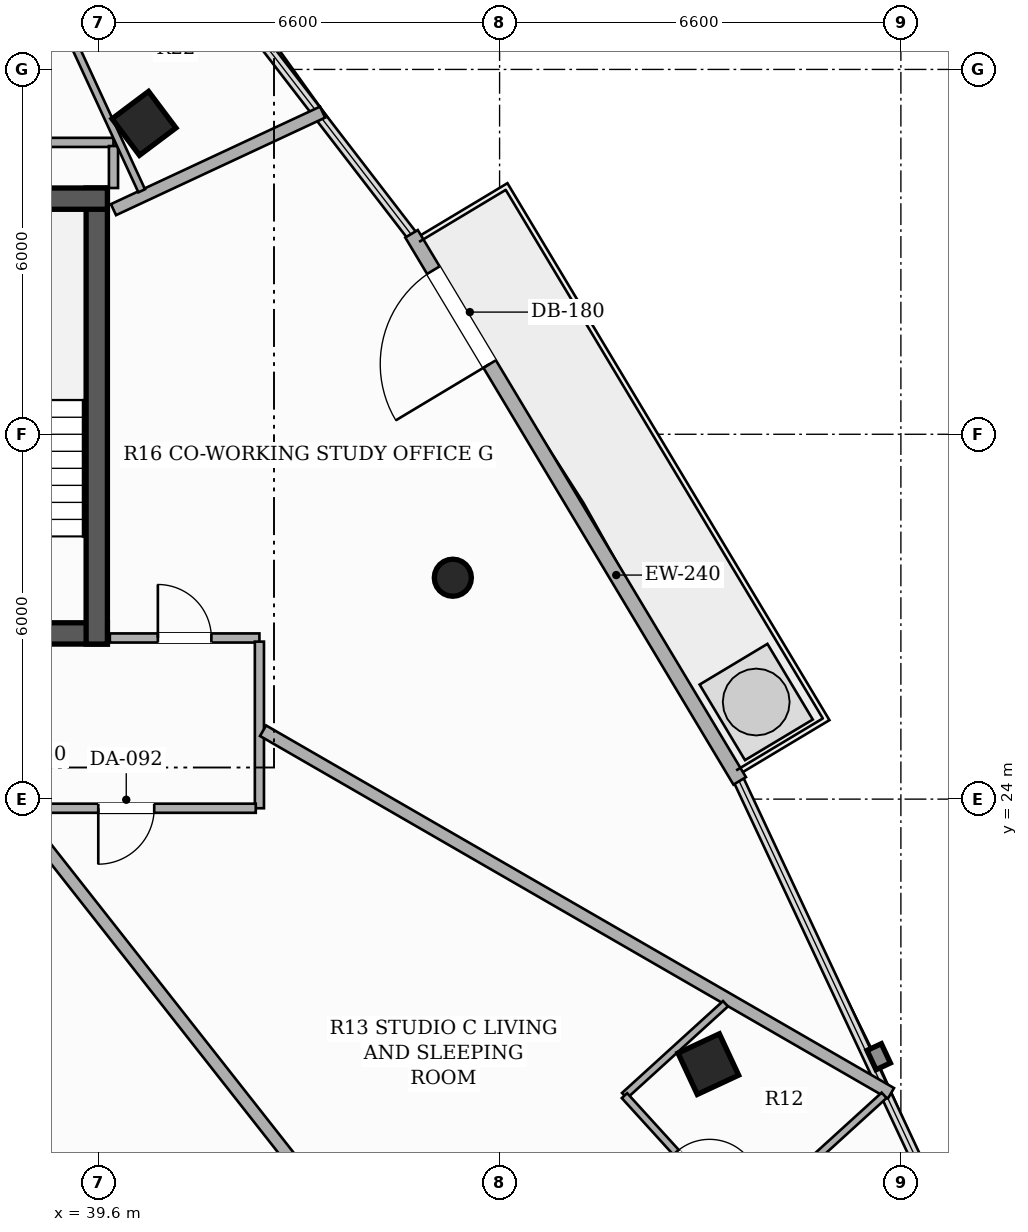
"""IFC4 building model, lengths in metres.
Left out: names, types, materials, properties, quantities, classifications, styles, units other than length and angle.
Written with IfcOpenShell. Run it as: python <this file> out.ifc"""

import sys

from ifc_helpers import new_model, si_unit, direction, frame, frame_2d, origin, origin_2d, place, context, subcontext, project, spatial, rectangle, hollow_rectangle, hollow_circle, extrude, element, fill, save


model = new_model("IFC4")
c1 = context("Model", 3, precision=1e-05, world=origin(), true_north=direction((0.0, 1.0)))
c2 = subcontext(c1, "Body", "Model", "MODEL_VIEW")
j1 = project(units=[si_unit("LENGTHUNIT", "METRE"), si_unit("PLANEANGLEUNIT", "RADIAN")], contexts=[c1])
p1 = place(None, origin())
s1 = spatial("IfcSite", under=j1, at=p1, CompositionType="ELEMENT")
p2 = place(p1, origin())
s2 = spatial("IfcBuilding", under=s1, at=p2, CompositionType="ELEMENT")
p3 = place(p2, frame((0.0, 0.0, 199.7)))
s3 = spatial("IfcBuildingStorey", under=s2, at=p3, CompositionType="ELEMENT", Elevation=199.7)
p4 = place(p3, frame((26.25, 26.725, 0.0), z_axis=(0.0, 0.0, 1.0), x_axis=(1.0, 0.0, 0.0)))
e1 = element("IfcWall", 1, at=p4, inside=s3, PredefinedType="SHEAR", context=c2, shape_type="SweptSolid", body=[
    extrude(rectangle(XDim=13.5, YDim=0.35, at=frame_2d((6.75, 0.0))), origin(), (0.0, 0.0, 1.0), 3.3),
])
p5 = place(p4, frame((4.35, 0.0, 0.0)))
e2 = element("IfcOpeningElement", 2, at=p5, cuts=e1, PredefinedType="OPENING", context=c2, shape_type="SweptSolid", body=[
    extrude(rectangle(XDim=1.05, YDim=2.15, at=frame_2d((0.525, 1.075))), frame((0.0, 0.185, 0.0), z_axis=(0.0, -1.0, 0.0), x_axis=(1.0, 0.0, 0.0)), (0.0, 0.0, 1.0), 0.37),
])
p6 = place(p4, frame((8.3, 0.0, 0.0)))
e3 = element("IfcOpeningElement", 3, at=p6, cuts=e1, PredefinedType="OPENING", context=c2, shape_type="SweptSolid", body=[
    extrude(rectangle(XDim=1.05, YDim=2.15, at=frame_2d((0.525, 1.075))), frame((0.0, 0.185, 0.0), z_axis=(0.0, -1.0, 0.0), x_axis=(1.0, 0.0, 0.0)), (0.0, 0.0, 1.0), 0.37),
])
p7 = place(p3, frame((39.575, 26.55, 0.0), z_axis=(0.0, 0.0, 1.0), x_axis=(0.0, 1.0, 0.0)))
e4 = element("IfcWall", 4, at=p7, inside=s3, PredefinedType="SHEAR", context=c2, shape_type="SweptSolid", body=[
    extrude(rectangle(XDim=7.5, YDim=0.35, at=frame_2d((3.75, 0.0))), origin(), (0.0, 0.0, 1.0), 3.3),
])
p8 = place(p3, frame((36.15, 33.875, 0.0), z_axis=(0.0, 0.0, 1.0), x_axis=(1.0, 0.0, 0.0)))
e5 = element("IfcWall", 5, at=p8, inside=s3, PredefinedType="SHEAR", context=c2, shape_type="SweptSolid", body=[
    extrude(rectangle(XDim=3.6, YDim=0.35, at=frame_2d((1.8, 0.0))), origin(), (0.0, 0.0, 1.0), 3.3),
])
p9 = place(p3, frame((49.633, 19.642, 0.0), z_axis=(0.0, 0.0, 1.0), x_axis=(-0.422618261741, 0.906307787037, 0.0)))
e6 = element("IfcColumn", 6, at=p9, inside=s3, PredefinedType="COLUMN", context=c2, shape_type="SweptSolid", body=[
    extrude(hollow_rectangle(XDim=0.75, YDim=0.75, WallThickness=0.025, at=origin_2d()), origin(), (0.0, 0.0, 1.0), 3.3),
])
p10 = place(p3, frame((45.431, 27.641, 0.0), z_axis=(0.0, 0.0, 1.0), x_axis=(1.0, 0.0, 0.0)))
e7 = element("IfcColumn", 7, at=p10, inside=s3, PredefinedType="COLUMN", context=c2, shape_type="SweptSolid", body=[
    extrude(hollow_circle(Radius=0.305, WallThickness=0.016, at=origin_2d()), origin(), (0.0, 0.0, 1.0), 3.3),
])
p11 = place(p3, frame((40.352, 35.113, 0.0), z_axis=(0.0, 0.0, 1.0), x_axis=(-0.600420225326, 0.799684658487, 0.0)))
e8 = element("IfcColumn", 8, at=p11, inside=s3, PredefinedType="COLUMN", context=c2, shape_type="SweptSolid", body=[
    extrude(hollow_rectangle(XDim=0.75, YDim=0.75, WallThickness=0.025, at=origin_2d()), origin(), (0.0, 0.0, 1.0), 3.3),
])
p12 = place(p3, frame((50.149, 24.3, 0.0), z_axis=(0.0, 0.0, 1.0), x_axis=(-0.514406779101, 0.857546305231, 0.0)))
e9 = element("IfcWall", 9, at=p12, inside=s3, PredefinedType="SOLIDWALL", context=c2, shape_type="SweptSolid", body=[
    extrude(rectangle(XDim=10.492, YDim=0.24, at=frame_2d((5.246, 0.0))), origin(), (0.0, 0.0, 1.0), 2.624),
])
p13 = place(p12, frame((7.994, 0.0, 0.0)))
e10 = element("IfcOpeningElement", 10, at=p13, cuts=e9, PredefinedType="OPENING", context=c2, shape_type="SweptSolid", body=[
    extrude(rectangle(XDim=1.8, YDim=2.2, at=frame_2d((0.9, 1.1))), frame((0.0, 0.13, 0.0), z_axis=(0.0, -1.0, 0.0), x_axis=(1.0, 0.0, 0.0)), (0.0, 0.0, 1.0), 0.26),
])
p14 = place(p3, frame((39.79, 26.65, 0.0), z_axis=(0.0, 0.0, 1.0), x_axis=(1.0, 0.0, 0.0)))
e11 = element("IfcWall", 11, at=p14, inside=s3, PredefinedType="PARTITIONING", context=c2, shape_type="SweptSolid", body=[
    extrude(rectangle(XDim=2.46, YDim=0.15, at=frame_2d((1.23, 0.0))), origin(), (0.0, 0.0, 1.0), 2.565),
])
p15 = place(p14, frame((0.79, 0.0, 0.0)))
e12 = element("IfcOpeningElement", 12, at=p15, cuts=e11, PredefinedType="OPENING", context=c2, shape_type="SweptSolid", body=[
    extrude(rectangle(XDim=0.88, YDim=2.1, at=frame_2d((0.44, 1.05))), frame((0.0, 0.085, 0.0), z_axis=(0.0, -1.0, 0.0), x_axis=(1.0, 0.0, 0.0)), (0.0, 0.0, 1.0), 0.17),
])
p16 = place(p3, frame((42.25, 26.59, 0.0), z_axis=(0.0, 0.0, 1.0), x_axis=(0.0, -1.0, 0.0)))
e13 = element("IfcWall", 13, at=p16, inside=s3, PredefinedType="PARTITIONING", context=c2, shape_type="SweptSolid", body=[
    extrude(rectangle(XDim=2.74, YDim=0.15, at=frame_2d((1.37, 0.0))), origin(), (0.0, 0.0, 1.0), 2.773),
])
p17 = place(p3, frame((42.19, 23.85, 0.0), z_axis=(0.0, 0.0, 1.0), x_axis=(-1.0, 0.0, 0.0)))
e14 = element("IfcWall", 14, at=p17, inside=s3, PredefinedType="PARTITIONING", context=c2, shape_type="SweptSolid", body=[
    extrude(rectangle(XDim=8.217, YDim=0.15, at=frame_2d((4.108, 0.0))), origin(), (0.0, 0.0, 1.0), 2.565),
])
p18 = place(p17, frame((1.67, 0.0, 0.0)))
e15 = element("IfcOpeningElement", 15, at=p18, cuts=e14, PredefinedType="OPENING", context=c2, shape_type="SweptSolid", body=[
    extrude(rectangle(XDim=0.92, YDim=2.15, at=frame_2d((0.46, 1.075))), frame((0.0, 0.085, 0.0), z_axis=(0.0, -1.0, 0.0), x_axis=(1.0, 0.0, 0.0)), (0.0, 0.0, 1.0), 0.17),
])
p19 = place(p17, frame((5.12, 0.0, 0.0)))
e16 = element("IfcOpeningElement", 16, at=p19, cuts=e14, PredefinedType="OPENING", context=c2, shape_type="SweptSolid", body=[
    extrude(rectangle(XDim=0.88, YDim=2.1, at=frame_2d((0.44, 1.05))), frame((0.0, 0.085, 0.0), z_axis=(0.0, -1.0, 0.0), x_axis=(1.0, 0.0, 0.0)), (0.0, 0.0, 1.0), 0.17),
])
p20 = place(p3, frame((36.31, 34.8, 0.0), z_axis=(0.0, 0.0, 1.0), x_axis=(1.0, 0.0, 0.0)))
e17 = element("IfcWall", 17, at=p20, inside=s3, PredefinedType="PARTITIONING", context=c2, shape_type="SweptSolid", body=[
    extrude(rectangle(XDim=3.54, YDim=0.15, at=frame_2d((1.77, 0.0))), origin(), (0.0, 0.0, 1.0), 2.425),
])
p21 = place(p3, frame((39.85, 34.74, 0.0), z_axis=(0.0, 0.0, 1.0), x_axis=(0.0, -1.0, 0.0)))
e18 = element("IfcWall", 18, at=p21, inside=s3, PredefinedType="PARTITIONING", context=c2, shape_type="SweptSolid", body=[
    extrude(rectangle(XDim=0.69, YDim=0.15, at=frame_2d((0.345, 0.0))), origin(), (0.0, 0.0, 1.0), 2.773),
])
p22 = place(p3, frame((52.214, 6.073, 0.0), z_axis=(0.0, 0.0, 1.0), x_axis=(-0.618246700658, 0.785984107425, 0.0)))
e19 = element("IfcWall", 19, at=p22, inside=s3, PredefinedType="PARTITIONING", context=c2, shape_type="SweptSolid", body=[
    extrude(rectangle(XDim=22.541, YDim=0.2, at=frame_2d((11.271, 0.0))), origin(), (0.0, 0.0, 1.0), 2.492),
])
p23 = place(p3, frame((42.31, 25.125, 0.0), z_axis=(0.0, 0.0, 1.0), x_axis=(0.866001812803, -0.500040858552, 0.0)))
e20 = element("IfcWall", 20, at=p23, inside=s3, PredefinedType="PARTITIONING", context=c2, shape_type="SweptSolid", body=[
    extrude(rectangle(XDim=11.925, YDim=0.2, at=frame_2d((5.962, 0.0))), origin(), (0.0, 0.0, 1.0), 2.492),
])
p24 = place(p3, frame((43.289, 35.298, 0.0), z_axis=(0.0, 0.0, 1.0), x_axis=(-0.906268592738, -0.422702304011, 0.0)))
e21 = element("IfcWall", 21, at=p24, inside=s3, PredefinedType="PARTITIONING", context=c2, shape_type="SweptSolid", body=[
    extrude(rectangle(XDim=3.795, YDim=0.2, at=frame_2d((1.897, 0.0))), origin(), (0.0, 0.0, 1.0), 2.492),
])
p25 = place(p3, frame((49.915, 20.635, 0.0), z_axis=(0.0, 0.0, 1.0), x_axis=(-0.739748179987, -0.672883816276, 0.0)))
e22 = element("IfcWall", 22, at=p25, inside=s3, PredefinedType="PARTITIONING", context=c2, shape_type="SweptSolid", body=[
    extrude(rectangle(XDim=2.246, YDim=0.12, at=frame_2d((1.123, 0.0))), origin(), (0.0, 0.0, 1.0), 2.492),
])
p26 = place(p3, frame((48.254, 19.124, 0.0), z_axis=(0.0, 0.0, 1.0), x_axis=(0.672884473084, -0.739747582546, 0.0)))
e23 = element("IfcWall", 23, at=p26, inside=s3, PredefinedType="PARTITIONING", context=c2, shape_type="SweptSolid", body=[
    extrude(rectangle(XDim=2.87, YDim=0.12, at=frame_2d((1.435, 0.0))), origin(), (0.0, 0.0, 1.0), 2.492),
])
p27 = place(p26, frame((1.26, 0.0, 0.0)))
e24 = element("IfcOpeningElement", 24, at=p27, cuts=e23, PredefinedType="OPENING", context=c2, shape_type="SweptSolid", body=[
    extrude(rectangle(XDim=0.82, YDim=2.1, at=frame_2d((0.41, 1.05))), frame((0.0, 0.07, 0.0), z_axis=(0.0, -1.0, 0.0), x_axis=(1.0, 0.0, 0.0)), (0.0, 0.0, 1.0), 0.14),
])
p28 = place(p3, frame((52.524, 19.129, 0.0), z_axis=(0.0, 0.0, 1.0), x_axis=(-0.739674496232, -0.672964813065, 0.0)))
e25 = element("IfcWall", 25, at=p28, inside=s3, PredefinedType="PARTITIONING", context=c2, shape_type="SweptSolid", body=[
    extrude(rectangle(XDim=3.162, YDim=0.12, at=frame_2d((1.581, 0.0))), origin(), (0.0, 0.0, 1.0), 2.492),
])
p29 = place(p3, frame((37.955, 39.114, 0.0), z_axis=(0.0, 0.0, 1.0), x_axis=(0.41911319203, -0.907933991139, 0.0)))
e26 = element("IfcWall", 26, at=p29, inside=s3, PredefinedType="PARTITIONING", context=c2, shape_type="SweptSolid", body=[
    extrude(rectangle(XDim=5.628, YDim=0.12, at=frame_2d((2.814, 0.0))), origin(), (0.0, 0.0, 1.0), 2.492),
])
p30 = place(p13, origin())
e27 = element("IfcDoor", 27, at=p30, inside=s3, OperationType="SINGLE_SWING_LEFT", PredefinedType="DOOR", context=c2, shape_type="SweptSolid", body=[
    extrude(rectangle(XDim=1.8, YDim=2.2, at=frame_2d((0.9, 1.1))), frame((0.0, 0.025, 0.0), z_axis=(0.0, -1.0, 0.0), x_axis=(1.0, 0.0, 0.0)), (0.0, 0.0, 1.0), 0.05),
])
fill(e10, e27)
p31 = place(p18, origin())
e28 = element("IfcDoor", 28, at=p31, inside=s3, OperationType="SINGLE_SWING_RIGHT", PredefinedType="DOOR", context=c2, shape_type="SweptSolid", body=[
    extrude(rectangle(XDim=0.92, YDim=2.15, at=frame_2d((0.46, 1.075))), frame((0.0, 0.025, 0.0), z_axis=(0.0, -1.0, 0.0), x_axis=(1.0, 0.0, 0.0)), (0.0, 0.0, 1.0), 0.05),
])
fill(e15, e28)
p32 = place(p27, origin())
e29 = element("IfcDoor", 29, at=p32, inside=s3, OperationType="SINGLE_SWING_RIGHT", PredefinedType="DOOR", context=c2, shape_type="SweptSolid", body=[
    extrude(rectangle(XDim=0.82, YDim=2.1, at=frame_2d((0.41, 1.05))), frame((0.0, 0.025, 0.0), z_axis=(0.0, -1.0, 0.0), x_axis=(1.0, 0.0, 0.0)), (0.0, 0.0, 1.0), 0.05),
])
fill(e24, e29)
p33 = place(p15, origin())
e30 = element("IfcDoor", 30, at=p33, inside=s3, OperationType="SINGLE_SWING_LEFT", PredefinedType="DOOR", context=c2, shape_type="SweptSolid", body=[
    extrude(rectangle(XDim=0.88, YDim=2.1, at=frame_2d((0.44, 1.05))), frame((0.0, 0.025, 0.0), z_axis=(0.0, -1.0, 0.0), x_axis=(1.0, 0.0, 0.0)), (0.0, 0.0, 1.0), 0.05),
])
fill(e12, e30)
save(model, sys.argv[1])
